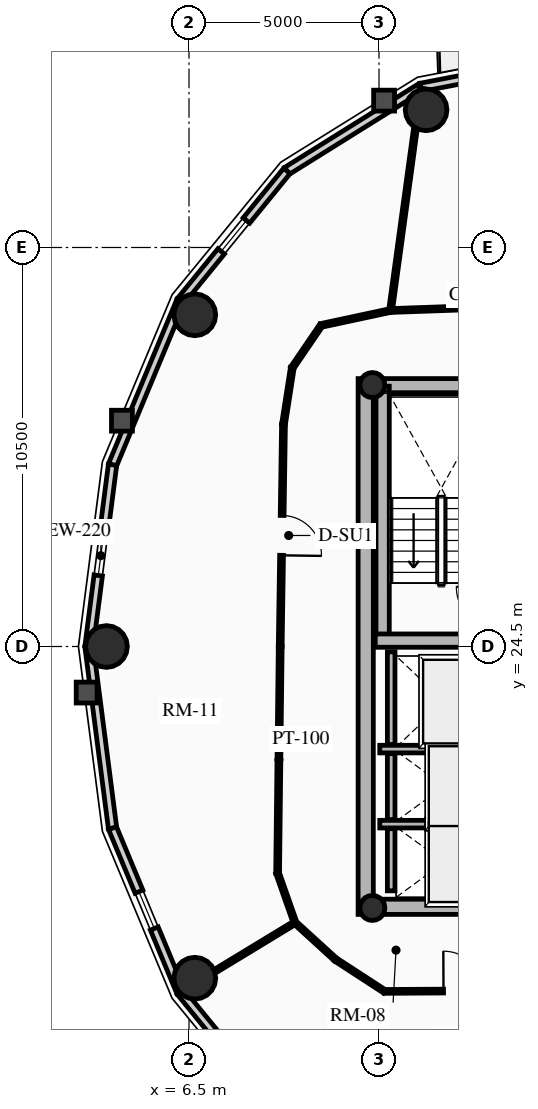
"""IFC4 building model, lengths in metres.
Left out: names, types, materials, properties, quantities, classifications, styles, units other than length and angle.
Written with IfcOpenShell. Run it as: python <this file> out.ifc"""

import sys

from ifc_helpers import new_model, si_unit, direction, frame, frame_2d, origin, origin_2d, place, context, subcontext, project, spatial, rectangle, circle, hollow_circle, extrude, source, transform, mapped, element, fill, save


model = new_model("IFC4")
c1 = context("Model", 3, precision=1e-05, world=origin(), true_north=direction((0.0, 1.0)))
c2 = subcontext(c1, "Body", "Model", "MODEL_VIEW")
j1 = project(units=[si_unit("LENGTHUNIT", "METRE"), si_unit("PLANEANGLEUNIT", "RADIAN")], contexts=[c1])
p1 = place(None, origin())
s1 = spatial("IfcSite", under=j1, at=p1, CompositionType="ELEMENT")
p2 = place(p1, origin())
s2 = spatial("IfcBuilding", under=s1, at=p2, CompositionType="ELEMENT")
p3 = place(p2, frame((0.0, 0.0, 199.57)))
s3 = spatial("IfcBuildingStorey", under=s2, at=p3, CompositionType="ELEMENT", Elevation=199.57)
p4 = place(p3, frame((11.15, 17.45, 0.0), z_axis=(0.0, 0.0, 1.0), x_axis=(0.0, 1.0, 0.0)))
e1 = element("IfcWall", 1, at=p4, inside=s3, PredefinedType="SHEAR", context=c2, shape_type="SweptSolid", body=[
    extrude(rectangle(XDim=14.1, YDim=0.4, at=frame_2d((7.05, 0.0))), origin(), (0.0, 0.0, 1.0), 2.91),
])
p5 = place(p3, frame((11.15, 17.65, 0.0), z_axis=(0.0, 0.0, 1.0), x_axis=(1.0, 0.0, 0.0)))
e2 = element("IfcWall", 2, at=p5, inside=s3, PredefinedType="SHEAR", context=c2, shape_type="SweptSolid", body=[
    extrude(rectangle(XDim=10.7, YDim=0.4, at=frame_2d((5.35, 0.0))), origin(), (0.0, 0.0, 1.0), 2.91),
])
m1 = source(origin(), c2, "Body", "SweptSolid", [
    extrude(rectangle(XDim=1.5, YDim=2.02, at=frame_2d((0.75, 1.01))), frame((0.0, 0.21, 0.0), z_axis=(0.0, -1.0, 0.0), x_axis=(1.0, 0.0, 0.0)), (0.0, 0.0, 1.0), 0.42),
])
p6 = place(p5, frame((5.45, 0.0, 0.0)))
e3 = element("IfcOpeningElement", 3, at=p6, cuts=e2, PredefinedType="OPENING", context=c2, shape_type="MappedRepresentation", body=[
    mapped(m1, transform((0.0, 0.0, 0.0), x_axis=(1.0, 0.0, 0.0), y_axis=(0.0, 1.0, 0.0), z_axis=(0.0, 0.0, 1.0), scale=1.0)),
])
p7 = place(p3, frame((11.15, 31.35, 0.0), z_axis=(0.0, 0.0, 1.0), x_axis=(1.0, 0.0, 0.0)))
e4 = element("IfcWall", 4, at=p7, inside=s3, PredefinedType="SHEAR", context=c2, shape_type="SweptSolid", body=[
    extrude(rectangle(XDim=10.7, YDim=0.4, at=frame_2d((5.35, 0.0))), origin(), (0.0, 0.0, 1.0), 2.91),
])
p8 = place(p7, frame((4.6, 0.0, 0.0)))
e5 = element("IfcOpeningElement", 5, at=p8, cuts=e4, PredefinedType="OPENING", context=c2, shape_type="MappedRepresentation", body=[
    mapped(m1, transform((0.0, 0.0, 0.0), x_axis=(1.0, 0.0, 0.0), y_axis=(0.0, 1.0, 0.0), z_axis=(0.0, 0.0, 1.0), scale=1.0)),
])
p9 = place(p3, frame((11.595, 24.655, 0.0), z_axis=(0.0, 0.0, 1.0), x_axis=(0.0, 1.0, 0.0)))
e6 = element("IfcWall", 6, at=p9, inside=s3, PredefinedType="SHEAR", context=c2, shape_type="SweptSolid", body=[
    extrude(rectangle(XDim=6.695, YDim=0.35, at=frame_2d((3.348, 0.0))), origin(), (0.0, 0.0, 1.0), 2.91),
])
p10 = place(p3, frame((11.4, 24.655, 0.0), z_axis=(0.0, 0.0, 1.0), x_axis=(1.0, 0.0, 0.0)))
e7 = element("IfcWall", 7, at=p10, inside=s3, PredefinedType="SHEAR", context=c2, shape_type="SweptSolid", body=[
    extrude(rectangle(XDim=3.285, YDim=0.35, at=frame_2d((1.643, 0.0))), origin(), (0.0, 0.0, 1.0), 2.91),
])
for number, where, z_axis, x_axis in (
    (8, (11.325, 17.62, 0.0), (0.0, 0.0, 1.0), (1.0, 0.0, 0.0)),
    (9, (11.325, 31.38, 0.0), (0.0, 0.0, 1.0), (1.0, 0.0, 0.0)),
):
    element("IfcColumn", number, at=place(p3, frame(where, z_axis=z_axis, x_axis=x_axis)), inside=s3, PredefinedType="COLUMN", context=c2, shape_type="SweptSolid", body=[
        extrude(hollow_circle(Radius=0.33, WallThickness=0.025, at=origin_2d()), origin(), (0.0, 0.0, 1.0), 2.91),
    ])
for number, where, z_axis, x_axis in (
    (10, (12.739, 38.623, 0.0), (0.0, 0.0, 1.0), (1.0, 0.0, 0.0)),
    (11, (6.653, 33.229, 0.0), (0.0, 0.0, 1.0), (1.0, 0.0, 0.0)),
    (12, (4.328, 24.5, 0.0), (0.0, 0.0, 1.0), (1.0, 0.0, 0.0)),
    (13, (6.653, 15.771, 0.0), (0.0, 0.0, 1.0), (1.0, 0.0, 0.0)),
):
    element("IfcColumn", number, at=place(p3, frame(where, z_axis=z_axis, x_axis=x_axis)), inside=s3, PredefinedType="USERDEFINED", context=c2, shape_type="SweptSolid", body=[
        extrude(circle(Radius=0.55, at=origin_2d()), origin(), (0.0, 0.0, 1.0), 2.91),
    ])
p11 = place(p3, frame((12.597, 39.213, 0.0), z_axis=(0.0, 0.0, 1.0), x_axis=(0.981700307484, 0.190432419211, 0.0)))
e14 = element("IfcWall", 14, at=p11, inside=s3, PredefinedType="SOLIDWALL", context=c2, shape_type="SweptSolid", body=[
    extrude(rectangle(XDim=3.976, YDim=0.22, at=frame_2d((1.988, 0.0))), origin(), (0.0, 0.0, 1.0), 2.322),
])
m2 = source(origin(), c2, "Body", "SweptSolid", [
    extrude(rectangle(XDim=1.15, YDim=2.005, at=frame_2d((0.575, 1.002))), frame((0.0, 0.12, 0.0), z_axis=(0.0, -1.0, 0.0), x_axis=(1.0, 0.0, 0.0)), (0.0, 0.0, 1.0), 0.24),
])
p12 = place(p11, frame((1.413, 0.0, 0.0)))
e15 = element("IfcOpeningElement", 15, at=p12, cuts=e14, PredefinedType="OPENING", context=c2, shape_type="MappedRepresentation", body=[
    mapped(m2, transform((0.0, 0.0, 0.0), x_axis=(1.0, 0.0, 0.0), y_axis=(0.0, 1.0, 0.0), z_axis=(0.0, 0.0, 1.0), scale=1.0)),
])
p13 = place(p3, frame((9.076, 37.015, 0.0), z_axis=(0.0, 0.0, 1.0), x_axis=(0.848318713376, 0.529485939886, 0.0)))
e16 = element("IfcWall", 16, at=p13, inside=s3, PredefinedType="SOLIDWALL", context=c2, shape_type="SweptSolid", body=[
    extrude(rectangle(XDim=4.15, YDim=0.22, at=frame_2d((2.075, 0.0))), origin(), (0.0, 0.0, 1.0), 2.322),
])
p14 = place(p3, frame((6.282, 33.593, 0.0), z_axis=(0.0, 0.0, 1.0), x_axis=(0.632467166636, 0.774587169483, 0.0)))
e17 = element("IfcWall", 17, at=p14, inside=s3, PredefinedType="SOLIDWALL", context=c2, shape_type="SweptSolid", body=[
    extrude(rectangle(XDim=4.418, YDim=0.22, at=frame_2d((2.209, 0.0))), origin(), (0.0, 0.0, 1.0), 2.322),
])
m3 = source(origin(), c2, "Body", "SweptSolid", [
    extrude(rectangle(XDim=1.05, YDim=1.3, at=frame_2d((0.525, 0.65))), frame((0.0, 0.12, 0.0), z_axis=(0.0, -1.0, 0.0), x_axis=(1.0, 0.0, 0.0)), (0.0, 0.0, 1.0), 0.24),
])
p15 = place(p14, frame((1.684, 0.0, 0.65)))
e18 = element("IfcOpeningElement", 18, at=p15, cuts=e17, PredefinedType="OPENING", context=c2, shape_type="MappedRepresentation", body=[
    mapped(m3, transform((0.0, 0.0, 0.0), x_axis=(1.0, 0.0, 0.0), y_axis=(0.0, 1.0, 0.0), z_axis=(0.0, 0.0, 1.0), scale=1.0)),
])
p16 = place(p3, frame((4.488, 29.281, 0.0), z_axis=(0.0, 0.0, 1.0), x_axis=(0.384036305194, 0.923317993052, 0.0)))
e19 = element("IfcWall", 19, at=p16, inside=s3, PredefinedType="SOLIDWALL", context=c2, shape_type="SweptSolid", body=[
    extrude(rectangle(XDim=4.671, YDim=0.22, at=frame_2d((2.335, 0.0))), origin(), (0.0, 0.0, 1.0), 2.322),
])
p17 = place(p3, frame((3.87, 24.5, 0.0), z_axis=(0.0, 0.0, 1.0), x_axis=(0.128241318541, 0.991742993027, 0.0)))
e20 = element("IfcWall", 20, at=p17, inside=s3, PredefinedType="SOLIDWALL", context=c2, shape_type="SweptSolid", body=[
    extrude(rectangle(XDim=4.82, YDim=0.22, at=frame_2d((2.41, 0.0))), origin(), (0.0, 0.0, 1.0), 2.322),
])
p18 = place(p17, frame((1.885, 0.0, 0.65)))
e21 = element("IfcOpeningElement", 21, at=p18, cuts=e20, PredefinedType="OPENING", context=c2, shape_type="MappedRepresentation", body=[
    mapped(m3, transform((0.0, 0.0, 0.0), x_axis=(1.0, 0.0, 0.0), y_axis=(0.0, 1.0, 0.0), z_axis=(0.0, 0.0, 1.0), scale=1.0)),
])
p19 = place(p3, frame((4.488, 19.719, 0.0), z_axis=(0.0, 0.0, 1.0), x_axis=(-0.128241318541, 0.991742993027, 0.0)))
e22 = element("IfcWall", 22, at=p19, inside=s3, PredefinedType="SOLIDWALL", context=c2, shape_type="SweptSolid", body=[
    extrude(rectangle(XDim=4.82, YDim=0.22, at=frame_2d((2.41, 0.0))), origin(), (0.0, 0.0, 1.0), 2.322),
])
p20 = place(p3, frame((6.282, 15.407, 0.0), z_axis=(0.0, 0.0, 1.0), x_axis=(-0.384036305194, 0.923317993052, 0.0)))
e23 = element("IfcWall", 23, at=p20, inside=s3, PredefinedType="SOLIDWALL", context=c2, shape_type="SweptSolid", body=[
    extrude(rectangle(XDim=4.671, YDim=0.22, at=frame_2d((2.335, 0.0))), origin(), (0.0, 0.0, 1.0), 2.322),
])
p21 = place(p20, frame((1.81, 0.0, 0.65)))
e24 = element("IfcOpeningElement", 24, at=p21, cuts=e23, PredefinedType="OPENING", context=c2, shape_type="MappedRepresentation", body=[
    mapped(m3, transform((0.0, 0.0, 0.0), x_axis=(1.0, 0.0, 0.0), y_axis=(0.0, 1.0, 0.0), z_axis=(0.0, 0.0, 1.0), scale=1.0)),
])
p22 = place(p3, frame((9.076, 11.985, 0.0), z_axis=(0.0, 0.0, 1.0), x_axis=(-0.632467166636, 0.774587169483, 0.0)))
e25 = element("IfcWall", 25, at=p22, inside=s3, PredefinedType="SOLIDWALL", context=c2, shape_type="SweptSolid", body=[
    extrude(rectangle(XDim=4.418, YDim=0.22, at=frame_2d((2.209, 0.0))), origin(), (0.0, 0.0, 1.0), 2.322),
])
p23 = place(p3, frame((11.52, 21.8, 0.0), z_axis=(0.0, 0.0, 1.0), x_axis=(1.0, 0.0, 0.0)))
e26 = element("IfcWall", 26, at=p23, inside=s3, PredefinedType="SHEAR", context=c2, shape_type="SweptSolid", body=[
    extrude(rectangle(XDim=2.97, YDim=0.2, at=frame_2d((1.485, 0.0))), origin(), (0.0, 0.0, 1.0), 2.91),
])
p24 = place(p3, frame((11.82, 21.92, 0.0), z_axis=(0.0, 0.0, 1.0), x_axis=(0.0, 1.0, 0.0)))
e27 = element("IfcWall", 27, at=p24, inside=s3, PredefinedType="SHEAR", context=c2, shape_type="SweptSolid", body=[
    extrude(rectangle(XDim=2.44, YDim=0.2, at=frame_2d((1.22, 0.0))), origin(), (0.0, 0.0, 1.0), 2.91),
])
p25 = place(p3, frame((11.52, 19.825, 0.0), z_axis=(0.0, 0.0, 1.0), x_axis=(1.0, 0.0, 0.0)))
e28 = element("IfcWall", 28, at=p25, inside=s3, PredefinedType="SHEAR", context=c2, shape_type="SweptSolid", body=[
    extrude(rectangle(XDim=2.97, YDim=0.2, at=frame_2d((1.485, 0.0))), origin(), (0.0, 0.0, 1.0), 2.91),
])
p26 = place(p3, frame((11.82, 19.945, 0.0), z_axis=(0.0, 0.0, 1.0), x_axis=(0.0, 1.0, 0.0)))
e29 = element("IfcWall", 29, at=p26, inside=s3, PredefinedType="SHEAR", context=c2, shape_type="SweptSolid", body=[
    extrude(rectangle(XDim=1.735, YDim=0.2, at=frame_2d((0.867, 0.0))), origin(), (0.0, 0.0, 1.0), 2.91),
])
p27 = place(p3, frame((11.82, 18.07, 0.0), z_axis=(0.0, 0.0, 1.0), x_axis=(0.0, 1.0, 0.0)))
e30 = element("IfcWall", 30, at=p27, inside=s3, PredefinedType="SHEAR", context=c2, shape_type="SweptSolid", body=[
    extrude(rectangle(XDim=1.635, YDim=0.2, at=frame_2d((0.817, 0.0))), origin(), (0.0, 0.0, 1.0), 2.91),
])
p28 = place(p3, frame((18.082, 33.56, 0.0), z_axis=(0.0, 0.0, 1.0), x_axis=(-0.999399009709, -0.034664382185, 0.0)))
e31 = element("IfcWall", 31, at=p28, inside=s3, PredefinedType="MOVABLE", context=c2, shape_type="SweptSolid", body=[
    extrude(rectangle(XDim=6.282, YDim=0.1, at=frame_2d((3.141, 0.0))), origin(), (0.0, 0.0, 1.0), 2.255),
])
p29 = place(p3, frame((11.803, 33.342, 0.0), z_axis=(0.0, 0.0, 1.0), x_axis=(-0.977750742783, -0.209770076483, 0.0)))
e32 = element("IfcWall", 32, at=p29, inside=s3, PredefinedType="MOVABLE", context=c2, shape_type="SweptSolid", body=[
    extrude(rectangle(XDim=1.868, YDim=0.1, at=frame_2d((0.934, 0.0))), origin(), (0.0, 0.0, 1.0), 2.255),
])
p30 = place(p3, frame((9.977, 32.95, 0.0), z_axis=(0.0, 0.0, 1.0), x_axis=(-0.563291804539, -0.826258036535, 0.0)))
e33 = element("IfcWall", 33, at=p30, inside=s3, PredefinedType="MOVABLE", context=c2, shape_type="SweptSolid", body=[
    extrude(rectangle(XDim=1.346, YDim=0.1, at=frame_2d((0.673, 0.0))), origin(), (0.0, 0.0, 1.0), 2.322),
])
p31 = place(p3, frame((9.219, 31.838, 0.0), z_axis=(0.0, 0.0, 1.0), x_axis=(-0.154065528966, -0.98806063214, 0.0)))
e34 = element("IfcWall", 34, at=p31, inside=s3, PredefinedType="MOVABLE", context=c2, shape_type="SweptSolid", body=[
    extrude(rectangle(XDim=1.507, YDim=0.1, at=frame_2d((0.753, 0.0))), origin(), (0.0, 0.0, 1.0), 2.255),
])
p32 = place(p3, frame((8.986, 30.349, 0.0), z_axis=(0.0, 0.0, 1.0), x_axis=(-0.014775478218, -0.999890836663, 0.0)))
e35 = element("IfcWall", 35, at=p32, inside=s3, PredefinedType="MOVABLE", context=c2, shape_type="SweptSolid", body=[
    extrude(rectangle(XDim=5.849, YDim=0.1, at=frame_2d((2.925, 0.0))), origin(), (0.0, 0.0, 1.0), 2.685),
])
m4 = source(origin(), c2, "Body", "SweptSolid", [
    extrude(rectangle(XDim=1.05, YDim=2.015, at=frame_2d((0.525, 1.007))), frame((0.0, 0.06, 0.0), z_axis=(0.0, -1.0, 0.0), x_axis=(1.0, 0.0, 0.0)), (0.0, 0.0, 1.0), 0.12),
])
p33 = place(p32, frame((2.4, 0.0, 0.0)))
e36 = element("IfcOpeningElement", 36, at=p33, cuts=e35, PredefinedType="OPENING", context=c2, shape_type="MappedRepresentation", body=[
    mapped(m4, transform((0.0, 0.0, 0.0), x_axis=(1.0, 0.0, 0.0), y_axis=(0.0, 1.0, 0.0), z_axis=(0.0, 0.0, 1.0), scale=1.0)),
])
p34 = place(p3, frame((8.9, 24.5, 0.0), z_axis=(0.0, 0.0, 1.0), x_axis=(-0.011416369353, -0.999934831132, 0.0)))
e37 = element("IfcWall", 37, at=p34, inside=s3, PredefinedType="MOVABLE", context=c2, shape_type="SweptSolid", body=[
    extrude(rectangle(XDim=5.967, YDim=0.1, at=frame_2d((2.983, 0.0))), origin(), (0.0, 0.0, 1.0), 2.322),
])
p35 = place(p3, frame((8.832, 18.534, 0.0), z_axis=(0.0, 0.0, 1.0), x_axis=(0.332031819657, -0.943268186008, 0.0)))
e38 = element("IfcWall", 38, at=p35, inside=s3, PredefinedType="MOVABLE", context=c2, shape_type="SweptSolid", body=[
    extrude(rectangle(XDim=1.377, YDim=0.1, at=frame_2d((0.688, 0.0))), origin(), (0.0, 0.0, 1.0), 2.255),
])
p36 = place(p3, frame((9.289, 17.235, 0.0), z_axis=(0.0, 0.0, 1.0), x_axis=(0.739015164946, -0.673688790155, 0.0)))
e39 = element("IfcWall", 39, at=p36, inside=s3, PredefinedType="MOVABLE", context=c2, shape_type="SweptSolid", body=[
    extrude(rectangle(XDim=1.446, YDim=0.1, at=frame_2d((0.723, 0.0))), origin(), (0.0, 0.0, 1.0), 2.322),
])
p37 = place(p3, frame((10.358, 16.26, 0.0), z_axis=(0.0, 0.0, 1.0), x_axis=(0.838265397059, -0.545262435983, 0.0)))
e40 = element("IfcWall", 40, at=p37, inside=s3, PredefinedType="MOVABLE", context=c2, shape_type="SweptSolid", body=[
    extrude(rectangle(XDim=1.534, YDim=0.1, at=frame_2d((0.767, 0.0))), origin(), (0.0, 0.0, 1.0), 2.255),
])
p38 = place(p3, frame((11.644, 15.424, 0.0), z_axis=(0.0, 0.0, 1.0), x_axis=(0.999986552511, 0.005186019339, 0.0)))
e41 = element("IfcWall", 41, at=p38, inside=s3, PredefinedType="MOVABLE", context=c2, shape_type="SweptSolid", body=[
    extrude(rectangle(XDim=3.201, YDim=0.1, at=frame_2d((1.601, 0.0))), origin(), (0.0, 0.0, 1.0), 2.322),
])
p39 = place(p38, frame((1.553, 0.0, 0.0)))
e42 = element("IfcOpeningElement", 42, at=p39, cuts=e41, PredefinedType="OPENING", context=c2, shape_type="MappedRepresentation", body=[
    mapped(m4, transform((0.0, 0.0, 0.0), x_axis=(1.0, 0.0, 0.0), y_axis=(0.0, 1.0, 0.0), z_axis=(0.0, 0.0, 1.0), scale=1.0)),
])
p40 = place(p3, frame((11.803, 33.342, 0.0), z_axis=(0.0, 0.0, 1.0), x_axis=(0.135452591041, 0.990783828885, 0.0)))
e43 = element("IfcWall", 43, at=p40, inside=s3, PredefinedType="MOVABLE", context=c2, shape_type="SweptSolid", body=[
    extrude(rectangle(XDim=5.906, YDim=0.1, at=frame_2d((2.953, 0.0))), origin(), (0.0, 0.0, 1.0), 2.322),
])
p41 = place(p3, frame((9.289, 17.235, 0.0), z_axis=(0.0, 0.0, 1.0), x_axis=(-0.854741081983, -0.519054604806, 0.0)))
e44 = element("IfcWall", 44, at=p41, inside=s3, PredefinedType="MOVABLE", context=c2, shape_type="SweptSolid", body=[
    extrude(rectangle(XDim=3.499, YDim=0.1, at=frame_2d((1.75, 0.0))), origin(), (0.0, 0.0, 1.0), 2.322),
])
m5 = source(origin(), c2, "Body", "SweptSolid", [
    extrude(rectangle(XDim=1.05, YDim=1.3, at=frame_2d((0.525, 0.65))), frame((0.0, 0.03, 0.0), z_axis=(0.0, -1.0, 0.0), x_axis=(1.0, 0.0, 0.0)), (0.0, 0.0, 1.0), 0.06),
])
p42 = place(p15, origin())
e45 = element("IfcWindow", 45, at=p42, inside=s3, PartitioningType="SINGLE_PANEL", PredefinedType="WINDOW", context=c2, shape_type="MappedRepresentation", body=[
    mapped(m5, transform((0.0, 0.0, 0.0), x_axis=(1.0, 0.0, 0.0), y_axis=(0.0, 1.0, 0.0), z_axis=(0.0, 0.0, 1.0), scale=1.0)),
])
fill(e18, e45)
p43 = place(p18, origin())
e46 = element("IfcWindow", 46, at=p43, inside=s3, PartitioningType="SINGLE_PANEL", PredefinedType="WINDOW", context=c2, shape_type="MappedRepresentation", body=[
    mapped(m5, transform((0.0, 0.0, 0.0), x_axis=(1.0, 0.0, 0.0), y_axis=(0.0, 1.0, 0.0), z_axis=(0.0, 0.0, 1.0), scale=1.0)),
])
fill(e21, e46)
p44 = place(p21, origin())
e47 = element("IfcWindow", 47, at=p44, inside=s3, PartitioningType="SINGLE_PANEL", PredefinedType="WINDOW", context=c2, shape_type="MappedRepresentation", body=[
    mapped(m5, transform((0.0, 0.0, 0.0), x_axis=(1.0, 0.0, 0.0), y_axis=(0.0, 1.0, 0.0), z_axis=(0.0, 0.0, 1.0), scale=1.0)),
])
fill(e24, e47)
m6 = source(origin(), c2, "Body", "SweptSolid", [
    extrude(rectangle(XDim=1.05, YDim=2.015, at=frame_2d((0.525, 1.007))), frame((0.0, 0.025, 0.0), z_axis=(0.0, -1.0, 0.0), x_axis=(1.0, 0.0, 0.0)), (0.0, 0.0, 1.0), 0.05),
])
p45 = place(p33, origin())
e48 = element("IfcDoor", 48, at=p45, inside=s3, OperationType="SINGLE_SWING_RIGHT", PredefinedType="DOOR", context=c2, shape_type="MappedRepresentation", body=[
    mapped(m6, transform((0.0, 0.0, 0.0), x_axis=(1.0, 0.0, 0.0), y_axis=(0.0, 1.0, 0.0), z_axis=(0.0, 0.0, 1.0), scale=1.0)),
])
fill(e36, e48)
p46 = place(p39, origin())
e49 = element("IfcDoor", 49, at=p46, inside=s3, OperationType="SINGLE_SWING_LEFT", PredefinedType="DOOR", context=c2, shape_type="MappedRepresentation", body=[
    mapped(m6, transform((0.0, 0.0, 0.0), x_axis=(1.0, 0.0, 0.0), y_axis=(0.0, 1.0, 0.0), z_axis=(0.0, 0.0, 1.0), scale=1.0)),
])
fill(e42, e49)
save(model, sys.argv[1])
